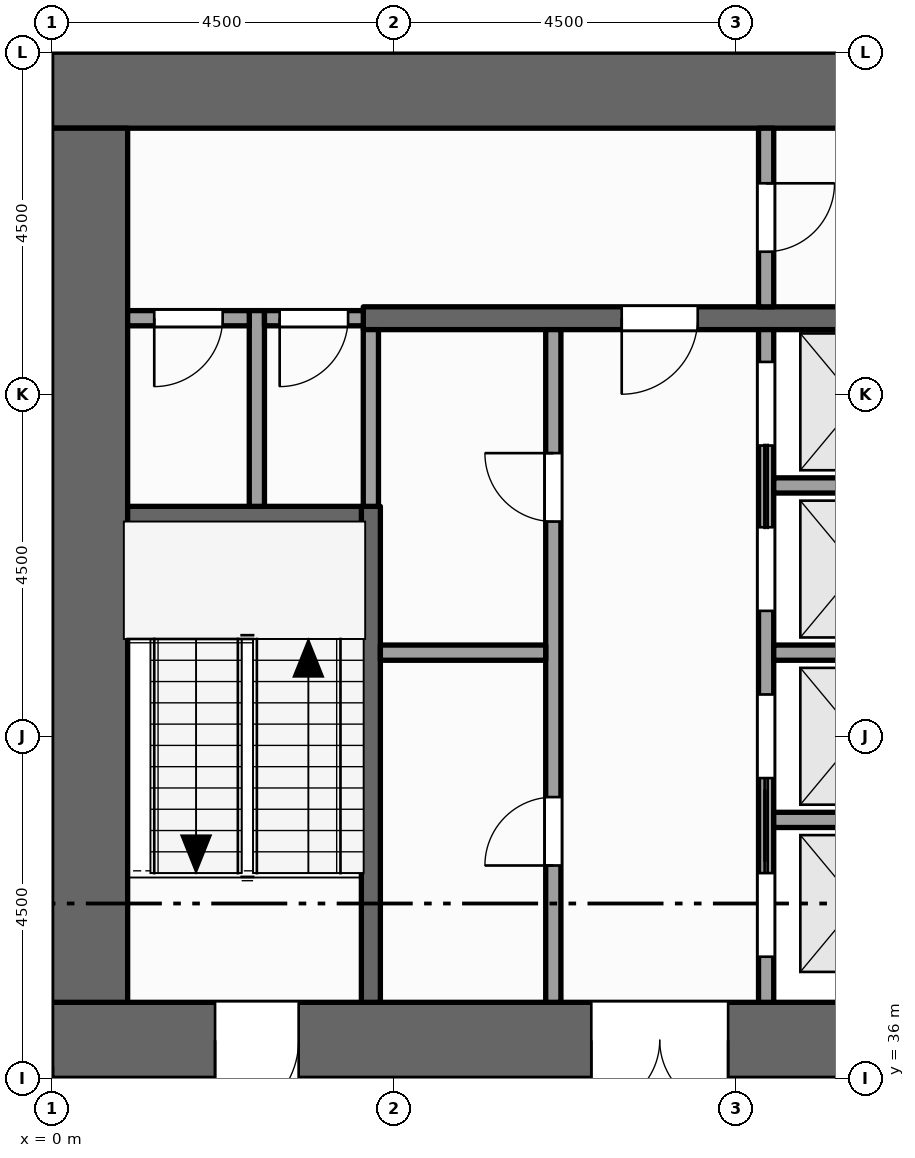
"""IFC4 building model, lengths in metres.
Left out: names, types, materials, properties, quantities, classifications, styles, units other than length and angle.
Written with IfcOpenShell. Run it as: python <this file> out.ifc"""

import sys

from ifc_helpers import new_model, si_unit, direction, frame, frame_2d, origin, place, context, subcontext, project, spatial, rectangle, extrude, element, fill, save


model = new_model("IFC4")
c1 = context("Model", 3, precision=1e-05, world=origin(), true_north=direction((0.0, 1.0)))
c2 = subcontext(c1, "Body", "Model", "MODEL_VIEW")
j1 = project(units=[si_unit("LENGTHUNIT", "METRE"), si_unit("PLANEANGLEUNIT", "RADIAN")], contexts=[c1])
p1 = place(None, origin())
s1 = spatial("IfcSite", under=j1, at=p1, CompositionType="ELEMENT")
p2 = place(p1, origin())
s2 = spatial("IfcBuilding", under=s1, at=p2, CompositionType="ELEMENT")
p3 = place(p2, frame((0.0, 0.0, 151.0)))
s3 = spatial("IfcBuildingStorey", under=s2, at=p3, CompositionType="ELEMENT", Elevation=151.0)
p4 = place(p3, frame((0.0, 36.5, -0.15), z_axis=(0.0, 0.0, 1.0), x_axis=(1.0, 0.0, 0.0)))
e1 = element("IfcWall", 1, at=p4, inside=s3, PredefinedType="SHEAR", context=c2, shape_type="SweptSolid", body=[
    extrude(rectangle(XDim=22.5, YDim=1.0, at=frame_2d((11.25, 0.0))), origin(), (0.0, 0.0, 1.0), 4.0),
])
p5 = place(p4, frame((7.1, 0.0, 0.15)))
e2 = element("IfcOpeningElement", 2, at=p5, cuts=e1, PredefinedType="OPENING", context=c2, shape_type="SweptSolid", body=[
    extrude(rectangle(XDim=1.8, YDim=2.1, at=frame_2d((0.9, 1.05))), frame((0.0, 0.51, 0.0), z_axis=(0.0, -1.0, 0.0), x_axis=(1.0, 0.0, 0.0)), (0.0, 0.0, 1.0), 1.02),
])
p6 = place(p4, frame((13.15, 0.0, 0.15)))
e3 = element("IfcOpeningElement", 3, at=p6, cuts=e1, PredefinedType="OPENING", context=c2, shape_type="SweptSolid", body=[
    extrude(rectangle(XDim=1.1, YDim=2.1, at=frame_2d((0.55, 1.05))), frame((0.0, 0.51, 0.0), z_axis=(0.0, -1.0, 0.0), x_axis=(1.0, 0.0, 0.0)), (0.0, 0.0, 1.0), 1.02),
])
p7 = place(p4, frame((2.15, 0.0, 0.15)))
e4 = element("IfcOpeningElement", 4, at=p7, cuts=e1, PredefinedType="OPENING", context=c2, shape_type="SweptSolid", body=[
    extrude(rectangle(XDim=1.1, YDim=2.1, at=frame_2d((0.55, 1.05))), frame((0.0, 0.51, 0.0), z_axis=(0.0, -1.0, 0.0), x_axis=(1.0, 0.0, 0.0)), (0.0, 0.0, 1.0), 1.02),
])
p8 = place(p4, frame((19.35, 0.0, 0.15)))
e5 = element("IfcOpeningElement", 5, at=p8, cuts=e1, PredefinedType="OPENING", context=c2, shape_type="SweptSolid", body=[
    extrude(rectangle(XDim=1.1, YDim=2.1, at=frame_2d((0.55, 1.05))), frame((0.0, 0.51, 0.0), z_axis=(0.0, -1.0, 0.0), x_axis=(1.0, 0.0, 0.0)), (0.0, 0.0, 1.0), 1.02),
])
p9 = place(p3, frame((0.0, 49.0, -0.15), z_axis=(0.0, 0.0, 1.0), x_axis=(1.0, 0.0, 0.0)))
e6 = element("IfcWall", 6, at=p9, inside=s3, PredefinedType="SHEAR", context=c2, shape_type="SweptSolid", body=[
    extrude(rectangle(XDim=22.5, YDim=1.0, at=frame_2d((11.25, 0.0))), origin(), (0.0, 0.0, 1.0), 4.0),
])
p10 = place(p3, frame((0.5, 37.0, -0.15), z_axis=(0.0, 0.0, 1.0), x_axis=(0.0, 1.0, 0.0)))
e7 = element("IfcWall", 7, at=p10, inside=s3, PredefinedType="SHEAR", context=c2, shape_type="SweptSolid", body=[
    extrude(rectangle(XDim=11.5, YDim=1.0, at=frame_2d((5.75, 0.0))), origin(), (0.0, 0.0, 1.0), 4.0),
])
p11 = place(p3, frame((0.0, 36.0, 0.0), z_axis=(0.0, 0.0, 1.0), x_axis=(-1.0, 0.0, 0.0)))
e8 = element("IfcWall", 8, at=p11, inside=s3, PredefinedType="STANDARD", context=c2, shape_type="SweptSolid", body=[
    extrude(rectangle(XDim=1.05, YDim=0.3, at=frame_2d((0.525, 0.0))), origin(), (0.0, 0.0, 1.0), 2.87),
])
p12 = place(p3, frame((2.7, 43.525, 0.0), z_axis=(0.0, 0.0, 1.0), x_axis=(0.0, 1.0, 0.0)))
e9 = element("IfcWall", 9, at=p12, inside=s3, PredefinedType="PARTITIONING", context=c2, shape_type="SweptSolid", body=[
    extrude(rectangle(XDim=2.575, YDim=0.2, at=frame_2d((1.288, 0.0))), origin(), (0.0, 0.0, 1.0), 3.85),
])
p13 = place(p3, frame((4.2, 37.0, 0.0), z_axis=(0.0, 0.0, 1.0), x_axis=(0.0, 1.0, 0.0)))
e10 = element("IfcWall", 10, at=p13, inside=s3, PredefinedType="SHEAR", context=c2, shape_type="SweptSolid", body=[
    extrude(rectangle(XDim=6.525, YDim=0.25, at=frame_2d((3.262, 0.0))), origin(), (0.0, 0.0, 1.0), 3.85),
])
p14 = place(p3, frame((4.2, 43.525, 0.0), z_axis=(0.0, 0.0, 1.0), x_axis=(0.0, 1.0, 0.0)))
e11 = element("IfcWall", 11, at=p14, inside=s3, PredefinedType="PARTITIONING", context=c2, shape_type="SweptSolid", body=[
    extrude(rectangle(XDim=2.325, YDim=0.2, at=frame_2d((1.163, 0.0))), origin(), (0.0, 0.0, 1.0), 3.85),
])
p15 = place(p3, frame((6.6, 37.0, 0.0), z_axis=(0.0, 0.0, 1.0), x_axis=(0.0, 1.0, 0.0)))
e12 = element("IfcWall", 12, at=p15, inside=s3, PredefinedType="PARTITIONING", context=c2, shape_type="SweptSolid", body=[
    extrude(rectangle(XDim=8.85, YDim=0.2, at=frame_2d((4.425, 0.0))), origin(), (0.0, 0.0, 1.0), 3.85),
])
p16 = place(p15, frame((1.8, 0.0, 0.0)))
e13 = element("IfcOpeningElement", 13, at=p16, cuts=e12, PredefinedType="OPENING", context=c2, shape_type="SweptSolid", body=[
    extrude(rectangle(XDim=0.9, YDim=2.1, at=frame_2d((0.45, 1.05))), frame((0.0, 0.11, 0.0), z_axis=(0.0, -1.0, 0.0), x_axis=(1.0, 0.0, 0.0)), (0.0, 0.0, 1.0), 0.22),
])
p17 = place(p15, frame((6.325, 0.0, 0.0)))
e14 = element("IfcOpeningElement", 14, at=p17, cuts=e12, PredefinedType="OPENING", context=c2, shape_type="SweptSolid", body=[
    extrude(rectangle(XDim=0.9, YDim=2.1, at=frame_2d((0.45, 1.05))), frame((0.0, 0.11, 0.0), z_axis=(0.0, -1.0, 0.0), x_axis=(1.0, 0.0, 0.0)), (0.0, 0.0, 1.0), 0.22),
])
p18 = place(p3, frame((9.4, 37.0, 0.0), z_axis=(0.0, 0.0, 1.0), x_axis=(0.0, 1.0, 0.0)))
e15 = element("IfcWall", 15, at=p18, inside=s3, PredefinedType="SOLIDWALL", context=c2, shape_type="SweptSolid", body=[
    extrude(rectangle(XDim=8.85, YDim=0.2, at=frame_2d((4.425, 0.0))), origin(), (0.0, 0.0, 1.0), 3.85),
])
p19 = place(p18, frame((0.6, 0.0, 0.012)))
e16 = element("IfcOpeningElement", 16, at=p19, cuts=e15, PredefinedType="OPENING", context=c2, shape_type="SweptSolid", body=[
    extrude(rectangle(XDim=1.1, YDim=2.1, at=frame_2d((0.55, 1.05))), frame((0.0, 0.11, 0.0), z_axis=(0.0, -1.0, 0.0), x_axis=(1.0, 0.0, 0.0)), (0.0, 0.0, 1.0), 0.22),
])
p20 = place(p18, frame((2.95, 0.0, 0.012)))
e17 = element("IfcOpeningElement", 17, at=p20, cuts=e15, PredefinedType="OPENING", context=c2, shape_type="SweptSolid", body=[
    extrude(rectangle(XDim=1.1, YDim=2.1, at=frame_2d((0.55, 1.05))), frame((0.0, 0.11, 0.0), z_axis=(0.0, -1.0, 0.0), x_axis=(1.0, 0.0, 0.0)), (0.0, 0.0, 1.0), 0.22),
])
p21 = place(p18, frame((5.15, 0.0, 0.012)))
e18 = element("IfcOpeningElement", 18, at=p21, cuts=e15, PredefinedType="OPENING", context=c2, shape_type="SweptSolid", body=[
    extrude(rectangle(XDim=1.1, YDim=2.1, at=frame_2d((0.55, 1.05))), frame((0.0, 0.11, 0.0), z_axis=(0.0, -1.0, 0.0), x_axis=(1.0, 0.0, 0.0)), (0.0, 0.0, 1.0), 0.22),
])
p22 = place(p18, frame((7.325, 0.0, 0.012)))
e19 = element("IfcOpeningElement", 19, at=p22, cuts=e15, PredefinedType="OPENING", context=c2, shape_type="SweptSolid", body=[
    extrude(rectangle(XDim=1.1, YDim=2.1, at=frame_2d((0.55, 1.05))), frame((0.0, 0.11, 0.0), z_axis=(0.0, -1.0, 0.0), x_axis=(1.0, 0.0, 0.0)), (0.0, 0.0, 1.0), 0.22),
])
p23 = place(p3, frame((9.4, 46.15, 0.0), z_axis=(0.0, 0.0, 1.0), x_axis=(0.0, 1.0, 0.0)))
e20 = element("IfcWall", 20, at=p23, inside=s3, PredefinedType="PARTITIONING", context=c2, shape_type="SweptSolid", body=[
    extrude(rectangle(XDim=2.35, YDim=0.2, at=frame_2d((1.175, 0.0))), origin(), (0.0, 0.0, 1.0), 3.85),
])
p24 = place(p23, frame((0.725, 0.0, 0.0)))
e21 = element("IfcOpeningElement", 21, at=p24, cuts=e20, PredefinedType="OPENING", context=c2, shape_type="SweptSolid", body=[
    extrude(rectangle(XDim=0.9, YDim=2.1, at=frame_2d((0.45, 1.05))), frame((0.0, 0.11, 0.0), z_axis=(0.0, -1.0, 0.0), x_axis=(1.0, 0.0, 0.0)), (0.0, 0.0, 1.0), 0.22),
])
p25 = place(p3, frame((9.5, 39.4, 0.0), z_axis=(0.0, 0.0, 1.0), x_axis=(1.0, 0.0, 0.0)))
e22 = element("IfcWall", 22, at=p25, inside=s3, PredefinedType="SOLIDWALL", context=c2, shape_type="SweptSolid", body=[
    extrude(rectangle(XDim=2.2, YDim=0.2, at=frame_2d((1.1, 0.0))), origin(), (0.0, 0.0, 1.0), 3.85),
])
p26 = place(p3, frame((4.325, 41.6, 0.0), z_axis=(0.0, 0.0, 1.0), x_axis=(1.0, 0.0, 0.0)))
e23 = element("IfcWall", 23, at=p26, inside=s3, PredefinedType="PARTITIONING", context=c2, shape_type="SweptSolid", body=[
    extrude(rectangle(XDim=2.175, YDim=0.2, at=frame_2d((1.087, 0.0))), origin(), (0.0, 0.0, 1.0), 3.85),
])
p27 = place(p3, frame((9.5, 41.6, 0.0), z_axis=(0.0, 0.0, 1.0), x_axis=(1.0, 0.0, 0.0)))
e24 = element("IfcWall", 24, at=p27, inside=s3, PredefinedType="SOLIDWALL", context=c2, shape_type="SweptSolid", body=[
    extrude(rectangle(XDim=2.2, YDim=0.2, at=frame_2d((1.1, 0.0))), origin(), (0.0, 0.0, 1.0), 3.85),
])
p28 = place(p3, frame((1.0, 43.4, 0.0), z_axis=(0.0, 0.0, 1.0), x_axis=(1.0, 0.0, 0.0)))
e25 = element("IfcWall", 25, at=p28, inside=s3, PredefinedType="SHEAR", context=c2, shape_type="SweptSolid", body=[
    extrude(rectangle(XDim=3.075, YDim=0.25, at=frame_2d((1.538, 0.0))), origin(), (0.0, 0.0, 1.0), 3.85),
])
p29 = place(p3, frame((9.5, 43.8, 0.0), z_axis=(0.0, 0.0, 1.0), x_axis=(1.0, 0.0, 0.0)))
e26 = element("IfcWall", 26, at=p29, inside=s3, PredefinedType="SOLIDWALL", context=c2, shape_type="SweptSolid", body=[
    extrude(rectangle(XDim=2.2, YDim=0.2, at=frame_2d((1.1, 0.0))), origin(), (0.0, 0.0, 1.0), 3.85),
])
p30 = place(p3, frame((1.0, 46.0, 0.0), z_axis=(0.0, 0.0, 1.0), x_axis=(1.0, 0.0, 0.0)))
e27 = element("IfcWall", 27, at=p30, inside=s3, PredefinedType="PARTITIONING", context=c2, shape_type="SweptSolid", body=[
    extrude(rectangle(XDim=1.6, YDim=0.2, at=frame_2d((0.8, 0.0))), origin(), (0.0, 0.0, 1.0), 3.85),
])
p31 = place(p30, frame((0.35, 0.0, 0.0)))
e28 = element("IfcOpeningElement", 28, at=p31, cuts=e27, PredefinedType="OPENING", context=c2, shape_type="SweptSolid", body=[
    extrude(rectangle(XDim=0.9, YDim=2.1, at=frame_2d((0.45, 1.05))), frame((0.0, 0.11, 0.0), z_axis=(0.0, -1.0, 0.0), x_axis=(1.0, 0.0, 0.0)), (0.0, 0.0, 1.0), 0.22),
])
p32 = place(p3, frame((2.8, 46.0, 0.0), z_axis=(0.0, 0.0, 1.0), x_axis=(1.0, 0.0, 0.0)))
e29 = element("IfcWall", 29, at=p32, inside=s3, PredefinedType="PARTITIONING", context=c2, shape_type="SweptSolid", body=[
    extrude(rectangle(XDim=1.3, YDim=0.2, at=frame_2d((0.65, 0.0))), origin(), (0.0, 0.0, 1.0), 3.85),
])
p33 = place(p32, frame((0.2, 0.0, 0.0)))
e30 = element("IfcOpeningElement", 30, at=p33, cuts=e29, PredefinedType="OPENING", context=c2, shape_type="SweptSolid", body=[
    extrude(rectangle(XDim=0.9, YDim=2.1, at=frame_2d((0.45, 1.05))), frame((0.0, 0.11, 0.0), z_axis=(0.0, -1.0, 0.0), x_axis=(1.0, 0.0, 0.0)), (0.0, 0.0, 1.0), 0.22),
])
p34 = place(p3, frame((4.1, 46.0, 0.0), z_axis=(0.0, 0.0, 1.0), x_axis=(1.0, 0.0, 0.0)))
e31 = element("IfcWall", 31, at=p34, inside=s3, PredefinedType="SHEAR", context=c2, shape_type="SweptSolid", body=[
    extrude(rectangle(XDim=14.5, YDim=0.3, at=frame_2d((7.25, 0.0))), origin(), (0.0, 0.0, 1.0), 3.85),
])
p35 = place(p34, frame((3.4, 0.0, 0.0)))
e32 = element("IfcOpeningElement", 32, at=p35, cuts=e31, PredefinedType="OPENING", context=c2, shape_type="SweptSolid", body=[
    extrude(rectangle(XDim=1.0, YDim=2.1, at=frame_2d((0.5, 1.05))), frame((0.0, 0.16, 0.0), z_axis=(0.0, -1.0, 0.0), x_axis=(1.0, 0.0, 0.0)), (0.0, 0.0, 1.0), 0.32),
])
p36 = place(p34, frame((9.1, 0.0, 0.0)))
e33 = element("IfcOpeningElement", 33, at=p36, cuts=e31, PredefinedType="OPENING", context=c2, shape_type="SweptSolid", body=[
    extrude(rectangle(XDim=1.0, YDim=2.1, at=frame_2d((0.5, 1.05))), frame((0.0, 0.16, 0.0), z_axis=(0.0, -1.0, 0.0), x_axis=(1.0, 0.0, 0.0)), (0.0, 0.0, 1.0), 0.32),
])
p37 = place(p19, origin())
e34 = element("IfcDoor", 34, at=p37, inside=s3, OperationType="SLIDING_TO_RIGHT", PredefinedType="DOOR", context=c2, shape_type="SweptSolid", body=[
    extrude(rectangle(XDim=1.1, YDim=2.1, at=frame_2d((0.55, 1.05))), frame((0.0, 0.025, 0.0), z_axis=(0.0, -1.0, 0.0), x_axis=(1.0, 0.0, 0.0)), (0.0, 0.0, 1.0), 0.05),
])
fill(e16, e34)
p38 = place(p20, origin())
e35 = element("IfcDoor", 35, at=p38, inside=s3, OperationType="SLIDING_TO_LEFT", PredefinedType="DOOR", context=c2, shape_type="SweptSolid", body=[
    extrude(rectangle(XDim=1.1, YDim=2.1, at=frame_2d((0.55, 1.05))), frame((0.0, 0.025, 0.0), z_axis=(0.0, -1.0, 0.0), x_axis=(1.0, 0.0, 0.0)), (0.0, 0.0, 1.0), 0.05),
])
fill(e17, e35)
p39 = place(p21, origin())
e36 = element("IfcDoor", 36, at=p39, inside=s3, OperationType="SLIDING_TO_RIGHT", PredefinedType="DOOR", context=c2, shape_type="SweptSolid", body=[
    extrude(rectangle(XDim=1.1, YDim=2.1, at=frame_2d((0.55, 1.05))), frame((0.0, 0.025, 0.0), z_axis=(0.0, -1.0, 0.0), x_axis=(1.0, 0.0, 0.0)), (0.0, 0.0, 1.0), 0.05),
])
fill(e18, e36)
p40 = place(p22, origin())
e37 = element("IfcDoor", 37, at=p40, inside=s3, OperationType="SLIDING_TO_LEFT", PredefinedType="DOOR", context=c2, shape_type="SweptSolid", body=[
    extrude(rectangle(XDim=1.1, YDim=2.1, at=frame_2d((0.55, 1.05))), frame((0.0, 0.025, 0.0), z_axis=(0.0, -1.0, 0.0), x_axis=(1.0, 0.0, 0.0)), (0.0, 0.0, 1.0), 0.05),
])
fill(e19, e37)
p41 = place(p5, origin())
e38 = element("IfcDoor", 38, at=p41, inside=s3, OperationType="DOUBLE_DOOR_SINGLE_SWING", PredefinedType="DOOR", context=c2, shape_type="SweptSolid", body=[
    extrude(rectangle(XDim=1.8, YDim=2.1, at=frame_2d((0.9, 1.05))), frame((0.0, 0.025, 0.0), z_axis=(0.0, -1.0, 0.0), x_axis=(1.0, 0.0, 0.0)), (0.0, 0.0, 1.0), 0.05),
])
fill(e2, e38)
p42 = place(p35, origin())
e39 = element("IfcDoor", 39, at=p42, inside=s3, OperationType="SINGLE_SWING_LEFT", PredefinedType="DOOR", context=c2, shape_type="SweptSolid", body=[
    extrude(rectangle(XDim=1.0, YDim=2.1, at=frame_2d((0.5, 1.05))), frame((0.0, 0.025, 0.0), z_axis=(0.0, -1.0, 0.0), x_axis=(1.0, 0.0, 0.0)), (0.0, 0.0, 1.0), 0.05),
])
fill(e32, e39)
p43 = place(p24, origin())
e40 = element("IfcDoor", 40, at=p43, inside=s3, OperationType="SINGLE_SWING_RIGHT", PredefinedType="DOOR", context=c2, shape_type="SweptSolid", body=[
    extrude(rectangle(XDim=0.9, YDim=2.1, at=frame_2d((0.45, 1.05))), frame((0.0, 0.025, 0.0), z_axis=(0.0, -1.0, 0.0), x_axis=(1.0, 0.0, 0.0)), (0.0, 0.0, 1.0), 0.05),
])
fill(e21, e40)
p44 = place(p7, origin())
e41 = element("IfcDoor", 41, at=p44, inside=s3, OperationType="SINGLE_SWING_LEFT", PredefinedType="DOOR", context=c2, shape_type="SweptSolid", body=[
    extrude(rectangle(XDim=1.1, YDim=2.1, at=frame_2d((0.55, 1.05))), frame((0.0, 0.025, 0.0), z_axis=(0.0, -1.0, 0.0), x_axis=(1.0, 0.0, 0.0)), (0.0, 0.0, 1.0), 0.05),
])
fill(e4, e41)
p45 = place(p31, origin())
e42 = element("IfcDoor", 42, at=p45, inside=s3, OperationType="SINGLE_SWING_LEFT", PredefinedType="DOOR", context=c2, shape_type="SweptSolid", body=[
    extrude(rectangle(XDim=0.9, YDim=2.1, at=frame_2d((0.45, 1.05))), frame((0.0, 0.025, 0.0), z_axis=(0.0, -1.0, 0.0), x_axis=(1.0, 0.0, 0.0)), (0.0, 0.0, 1.0), 0.05),
])
fill(e28, e42)
p46 = place(p33, origin())
e43 = element("IfcDoor", 43, at=p46, inside=s3, OperationType="SINGLE_SWING_LEFT", PredefinedType="DOOR", context=c2, shape_type="SweptSolid", body=[
    extrude(rectangle(XDim=0.9, YDim=2.1, at=frame_2d((0.45, 1.05))), frame((0.0, 0.025, 0.0), z_axis=(0.0, -1.0, 0.0), x_axis=(1.0, 0.0, 0.0)), (0.0, 0.0, 1.0), 0.05),
])
fill(e30, e43)
p47 = place(p16, origin())
e44 = element("IfcDoor", 44, at=p47, inside=s3, OperationType="SINGLE_SWING_LEFT", PredefinedType="DOOR", context=c2, shape_type="SweptSolid", body=[
    extrude(rectangle(XDim=0.9, YDim=2.1, at=frame_2d((0.45, 1.05))), frame((0.0, 0.025, 0.0), z_axis=(0.0, -1.0, 0.0), x_axis=(1.0, 0.0, 0.0)), (0.0, 0.0, 1.0), 0.05),
])
fill(e13, e44)
p48 = place(p17, origin())
e45 = element("IfcDoor", 45, at=p48, inside=s3, OperationType="SINGLE_SWING_RIGHT", PredefinedType="DOOR", context=c2, shape_type="SweptSolid", body=[
    extrude(rectangle(XDim=0.9, YDim=2.1, at=frame_2d((0.45, 1.05))), frame((0.0, 0.025, 0.0), z_axis=(0.0, -1.0, 0.0), x_axis=(1.0, 0.0, 0.0)), (0.0, 0.0, 1.0), 0.05),
])
fill(e14, e45)
save(model, sys.argv[1])
